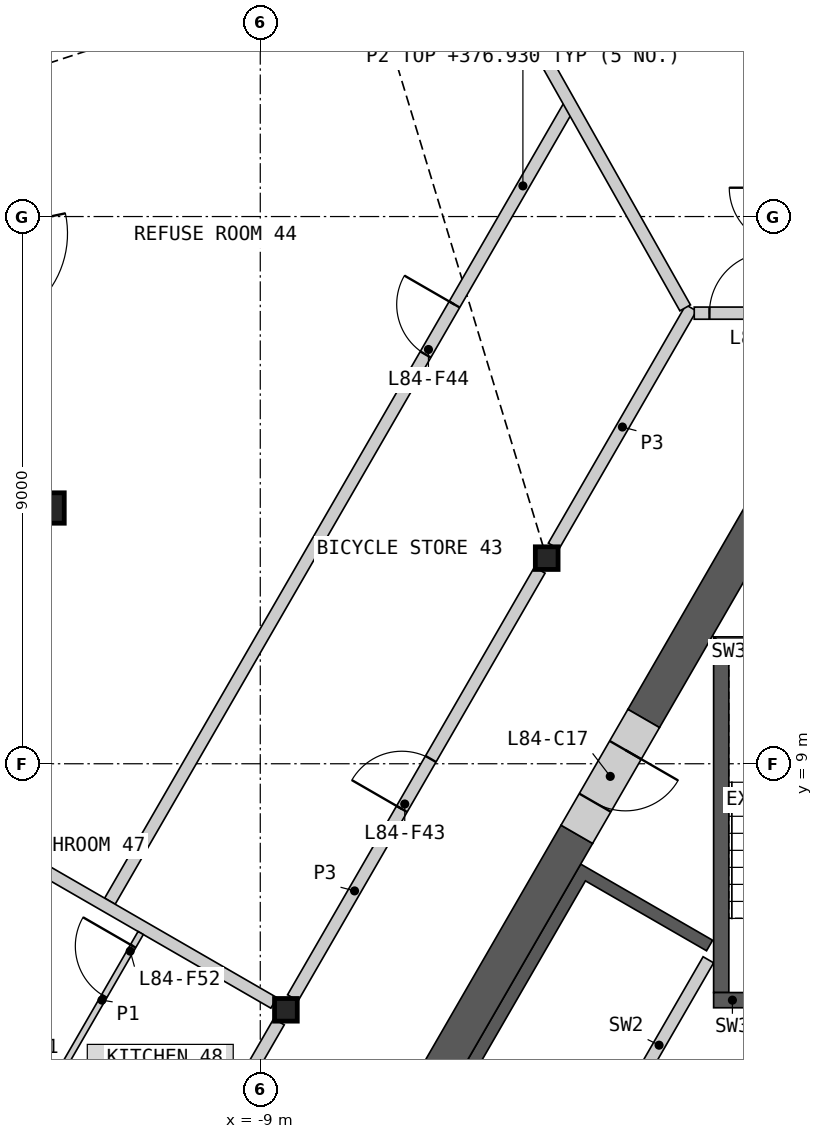
"""IFC4 building model, lengths in metres.
Left out: names, types, materials, properties, quantities, classifications, styles, units other than length and angle.
Written with IfcOpenShell. Run it as: python <this file> out.ifc"""

import sys

from ifc_helpers import new_model, si_unit, direction, frame, frame_2d, origin, origin_2d, place, context, subcontext, project, spatial, polyline, rectangle, hollow_rectangle, i_section, outline, extrude, element, fill, save


model = new_model("IFC4")
c1 = context("Model", 3, precision=1e-05, world=origin(), true_north=direction((0.0, 1.0)))
c2 = subcontext(c1, "Body", "Model", "MODEL_VIEW")
j1 = project(units=[si_unit("LENGTHUNIT", "METRE"), si_unit("PLANEANGLEUNIT", "RADIAN")], contexts=[c1])
p1 = place(None, origin())
s1 = spatial("IfcSite", under=j1, at=p1, CompositionType="ELEMENT")
p2 = place(p1, origin())
s2 = spatial("IfcBuilding", under=s1, at=p2, CompositionType="ELEMENT")
p3 = place(p2, frame((0.0, 0.0, 374.6)))
s3 = spatial("IfcBuildingStorey", under=s2, at=p3, CompositionType="ELEMENT", Elevation=374.6)
p4 = place(p3, frame((-12.474, 13.206, 0.0), z_axis=(0.0, 0.0, 1.0), x_axis=(1.0, 0.0, 0.0)))
e1 = element("IfcColumn", 1, at=p4, inside=s3, PredefinedType="COLUMN", context=c2, shape_type="SweptSolid", body=[
    extrude(hollow_rectangle(XDim=0.5, YDim=0.5, WallThickness=0.03, at=origin_2d()), origin(), (0.0, 0.0, 1.0), 3.4),
])
for number, where, z_axis, x_axis in (
    (2, (-4.289, 12.382, 0.0), (0.0, 0.0, 1.0), (1.0, 0.0, 0.0)),
    (3, (-8.578, 4.953, 0.0), (0.0, 0.0, 1.0), (1.0, 0.0, 0.0)),
):
    element("IfcColumn", number, at=place(p3, frame(where, z_axis=z_axis, x_axis=x_axis)), inside=s3, PredefinedType="COLUMN", context=c2, shape_type="SweptSolid", body=[
        extrude(i_section(OverallWidth=0.374, OverallDepth=0.372, WebThickness=0.016, FlangeThickness=0.026, at=origin_2d()), origin(), (0.0, 0.0, 1.0), 3.4),
    ])
p5 = place(p3, origin())
e4 = element("IfcWall", 4, at=p5, inside=s3, PredefinedType="SHEAR", context=c2, shape_type="SweptSolid", body=[
    extrude(outline(polyline([(-4.96, 0.208), (-7.131, 1.461), (-3.731, 7.35), (-1.561, 6.097), (-1.66, 5.924), (-3.652, 7.074), (-6.852, 1.531), (-4.861, 0.381), (-4.96, 0.208)])), origin(), (0.0, 0.0, 1.0), 3.1),
])
p6 = place(p3, frame((-1.631, 5.776, 0.0), z_axis=(0.0, 0.0, 1.0), x_axis=(-0.499992876559, -0.866029516466, 0.0)))
e5 = element("IfcWall", 5, at=p6, inside=s3, PredefinedType="SOLIDWALL", context=c2, shape_type="SweptSolid", body=[
    extrude(rectangle(XDim=6.486, YDim=0.2, at=frame_2d((3.243, 0.0))), origin(), (0.0, 0.0, 1.0), 3.1),
])
p7 = place(p6, frame((2.637, 0.0, 0.0)))
e6 = element("IfcOpeningElement", 6, at=p7, cuts=e5, PredefinedType="OPENING", context=c2, shape_type="SweptSolid", body=[
    extrude(rectangle(XDim=0.9, YDim=2.1, at=frame_2d((0.45, 1.05))), frame((0.0, 0.11, 0.0), z_axis=(0.0, -1.0, 0.0), x_axis=(1.0, 0.0, 0.0)), (0.0, 0.0, 1.0), 0.22),
])
p8 = place(p3, origin())
e7 = element("IfcWall", 7, at=p8, inside=s3, PredefinedType="SHEAR", context=c2, shape_type="SweptSolid", body=[
    extrude(outline(polyline([(1.544, 11.087), (-1.544, 11.087), (-1.294, 10.837), (1.294, 10.837), (1.544, 11.087)])), origin(), (0.0, 0.0, 1.0), 3.1),
])
p9 = place(p3, origin())
e8 = element("IfcWall", 8, at=p9, inside=s3, PredefinedType="SHEAR", context=c2, shape_type="SweptSolid", body=[
    extrude(outline(polyline([(-1.294, 10.837), (-1.544, 11.087), (-1.544, 5.237), (-1.294, 5.237), (-1.294, 10.837)])), origin(), (0.0, 0.0, 1.0), 3.1),
])
p10 = place(p3, frame((1.544, 5.112, 0.0), z_axis=(0.0, 0.0, 1.0), x_axis=(-1.0, 0.0, 0.0)))
e9 = element("IfcWall", 9, at=p10, inside=s3, PredefinedType="SHEAR", context=c2, shape_type="SweptSolid", body=[
    extrude(rectangle(XDim=3.088, YDim=0.25, at=frame_2d((1.544, 0.0))), origin(), (0.0, 0.0, 1.0), 3.1),
])
p11 = place(p10, frame((0.994, 0.0, 0.0)))
e10 = element("IfcOpeningElement", 10, at=p11, cuts=e9, PredefinedType="OPENING", context=c2, shape_type="SweptSolid", body=[
    extrude(rectangle(XDim=1.1, YDim=2.1, at=frame_2d((0.55, 1.05))), frame((0.0, 0.135, 0.0), z_axis=(0.0, -1.0, 0.0), x_axis=(1.0, 0.0, 0.0)), (0.0, 0.0, 1.0), 0.27),
])
p12 = place(p3, frame((-3.794, 7.84, 0.0), z_axis=(0.0, 0.0, 1.0), x_axis=(-0.499974747889, -0.866039982607, 0.0)))
e11 = element("IfcWall", 11, at=p12, inside=s3, PredefinedType="SHEAR", context=c2, shape_type="SweptSolid", body=[
    extrude(rectangle(XDim=7.092, YDim=0.6, at=frame_2d((3.546, 0.0))), origin(), (0.0, 0.0, 1.0), 3.1),
])
p13 = place(p3, frame((-0.26, 13.961, 0.0), z_axis=(0.0, 0.0, 1.0), x_axis=(-0.50000604952, -0.866021911064, 0.0)))
e12 = element("IfcWall", 12, at=p13, inside=s3, PredefinedType="SHEAR", context=c2, shape_type="SweptSolid", body=[
    extrude(rectangle(XDim=4.869, YDim=0.6, at=frame_2d((2.434, 0.0))), origin(), (0.0, 0.0, 1.0), 3.1),
])
p14 = place(p3, frame((-2.694, 9.745, 0.0), z_axis=(0.0, 0.0, 1.0), x_axis=(-0.50002983664, -0.866008176907, 0.0)))
e13 = element("IfcWall", 13, at=p14, inside=s3, PredefinedType="SHEAR", context=c2, shape_type="SweptSolid", body=[
    extrude(rectangle(XDim=2.2, YDim=0.6, at=frame_2d((1.1, 0.0))), origin(), (0.0, 0.0, 1.0), 3.1),
])
p15 = place(p14, frame((0.6, 0.0, 0.0)))
e14 = element("IfcOpeningElement", 14, at=p15, cuts=e13, PredefinedType="OPENING", context=c2, shape_type="SweptSolid", body=[
    extrude(rectangle(XDim=1.0, YDim=2.1, at=frame_2d((0.5, 1.05))), frame((0.0, 0.31, 0.0), z_axis=(0.0, -1.0, 0.0), x_axis=(1.0, 0.0, 0.0)), (0.0, 0.0, 1.0), 0.62),
])
p16 = place(p3, frame((-8.465, 5.15, 0.0), z_axis=(0.0, 0.0, 1.0), x_axis=(0.499992155518, 0.866029932751, 0.0)))
e15 = element("IfcWall", 15, at=p16, inside=s3, PredefinedType="PARTITIONING", context=c2, shape_type="SweptSolid", body=[
    extrude(rectangle(XDim=8.123, YDim=0.2, at=frame_2d((4.062, 0.0))), origin(), (0.0, 0.0, 1.0), 3.1),
])
p17 = place(p16, frame((3.587, 0.0, 0.0)))
e16 = element("IfcOpeningElement", 16, at=p17, cuts=e15, PredefinedType="OPENING", context=c2, shape_type="SweptSolid", body=[
    extrude(rectangle(XDim=0.95, YDim=2.1, at=frame_2d((0.475, 1.05))), frame((0.0, 0.11, 0.0), z_axis=(0.0, -1.0, 0.0), x_axis=(1.0, 0.0, 0.0)), (0.0, 0.0, 1.0), 0.22),
])
p18 = place(p3, frame((-12.754, -2.279, 0.0), z_axis=(0.0, 0.0, 1.0), x_axis=(0.500001682468, 0.866024432409, 0.0)))
e17 = element("IfcWall", 17, at=p18, inside=s3, PredefinedType="PARTITIONING", context=c2, shape_type="SweptSolid", body=[
    extrude(rectangle(XDim=8.124, YDim=0.2, at=frame_2d((4.062, 0.0))), origin(), (0.0, 0.0, 1.0), 3.1),
])
p19 = place(p18, frame((3.762, 0.0, 0.0)))
e18 = element("IfcOpeningElement", 18, at=p19, cuts=e17, PredefinedType="OPENING", context=c2, shape_type="SweptSolid", body=[
    extrude(rectangle(XDim=1.0, YDim=2.1, at=frame_2d((0.5, 1.05))), frame((0.0, 0.11, 0.0), z_axis=(0.0, -1.0, 0.0), x_axis=(1.0, 0.0, 0.0)), (0.0, 0.0, 1.0), 0.22),
])
p20 = place(p3, frame((-4.176, 12.579, 0.0), z_axis=(0.0, 0.0, 1.0), x_axis=(0.499974648164, 0.866040040179, 0.0)))
e19 = element("IfcWall", 19, at=p20, inside=s3, PredefinedType="PARTITIONING", context=c2, shape_type="SweptSolid", body=[
    extrude(rectangle(XDim=4.525, YDim=0.2, at=frame_2d((2.263, 0.0))), origin(), (0.0, 0.0, 1.0), 3.1),
])
p21 = place(p3, frame((-1.863, 16.411, 0.0), z_axis=(0.0, 0.0, 1.0), x_axis=(1.0, 0.0, 0.0)))
e20 = element("IfcWall", 20, at=p21, inside=s3, PredefinedType="PARTITIONING", context=c2, shape_type="SweptSolid", body=[
    extrude(rectangle(XDim=3.701, YDim=0.2, at=frame_2d((1.851, 0.0))), origin(), (0.0, 0.0, 1.0), 3.1),
])
p22 = place(p21, frame((0.25, 0.0, 0.0)))
e21 = element("IfcOpeningElement", 21, at=p22, cuts=e20, PredefinedType="OPENING", context=c2, shape_type="SweptSolid", body=[
    extrude(rectangle(XDim=1.0, YDim=2.1, at=frame_2d((0.5, 1.05))), frame((0.0, 0.11, 0.0), z_axis=(0.0, -1.0, 0.0), x_axis=(1.0, 0.0, 0.0)), (0.0, 0.0, 1.0), 0.22),
])
p23 = place(p3, frame((-11.473, 6.74, 0.0), z_axis=(0.0, 0.0, 1.0), x_axis=(0.500001082559, 0.866024778768, 0.0)))
e22 = element("IfcWall", 22, at=p23, inside=s3, PredefinedType="PARTITIONING", context=c2, shape_type="SweptSolid", body=[
    extrude(rectangle(XDim=15.094, YDim=0.2, at=frame_2d((7.547, 0.0))), origin(), (0.0, 0.0, 1.0), 2.33),
])
p24 = place(p23, frame((10.383, 0.0, 0.0)))
e23 = element("IfcOpeningElement", 23, at=p24, cuts=e22, PredefinedType="OPENING", context=c2, shape_type="SweptSolid", body=[
    extrude(rectangle(XDim=0.95, YDim=2.1, at=frame_2d((0.475, 1.05))), frame((0.0, 0.11, 0.0), z_axis=(0.0, -1.0, 0.0), x_axis=(1.0, 0.0, 0.0)), (0.0, 0.0, 1.0), 0.22),
])
p25 = place(p3, frame((-8.865, 28.649, 0.0), z_axis=(0.0, 0.0, 1.0), x_axis=(0.491236420263, -0.871026279401, 0.0)))
e24 = element("IfcWall", 24, at=p25, inside=s3, PredefinedType="PARTITIONING", context=c2, shape_type="SweptSolid", body=[
    extrude(rectangle(XDim=13.95, YDim=0.2, at=frame_2d((6.975, 0.0))), origin(), (0.0, 0.0, 1.0), 2.33),
])
p26 = place(p3, frame((-18.869, 10.894, 0.0), z_axis=(0.0, 0.0, 1.0), x_axis=(0.866023724155, -0.500002909193, 0.0)))
e25 = element("IfcWall", 25, at=p26, inside=s3, PredefinedType="PARTITIONING", context=c2, shape_type="SweptSolid", body=[
    extrude(rectangle(XDim=11.655, YDim=0.2, at=frame_2d((5.827, 0.0))), origin(), (0.0, 0.0, 1.0), 2.33),
])
p27 = place(p3, frame((-15.318, 5.38, 0.0), z_axis=(0.0, 0.0, 1.0), x_axis=(0.866035260786, -0.499982926783, 0.0)))
e26 = element("IfcWall", 26, at=p27, inside=s3, PredefinedType="PARTITIONING", context=c2, shape_type="SweptSolid", body=[
    extrude(rectangle(XDim=5.95, YDim=0.1, at=frame_2d((2.975, 0.0))), origin(), (0.0, 0.0, 1.0), 2.33),
])
p28 = place(p3, frame((-14.735, 5.389, 0.0), z_axis=(0.0, 0.0, 1.0), x_axis=(0.866032775405, -0.499987231761, 0.0)))
e27 = element("IfcWall", 27, at=p28, inside=s3, PredefinedType="PARTITIONING", context=c2, shape_type="SweptSolid", body=[
    extrude(rectangle(XDim=2.9, YDim=0.1, at=frame_2d((1.45, 0.0))), origin(), (0.0, 0.0, 1.0), 2.33),
])
p29 = place(p3, frame((-12.242, 4.008, 0.0), z_axis=(0.0, 0.0, 1.0), x_axis=(0.499948979701, 0.866054858364, 0.0)))
e28 = element("IfcWall", 28, at=p29, inside=s3, PredefinedType="PARTITIONING", context=c2, shape_type="SweptSolid", body=[
    extrude(rectangle(XDim=2.55, YDim=0.1, at=frame_2d((1.275, 0.0))), origin(), (0.0, 0.0, 1.0), 2.33),
])
p30 = place(p29, frame((1.35, 0.0, 0.0)))
e29 = element("IfcOpeningElement", 29, at=p30, cuts=e28, PredefinedType="OPENING", context=c2, shape_type="SweptSolid", body=[
    extrude(rectangle(XDim=0.95, YDim=2.1, at=frame_2d((0.475, 1.05))), frame((0.0, 0.06, 0.0), z_axis=(0.0, -1.0, 0.0), x_axis=(1.0, 0.0, 0.0)), (0.0, 0.0, 1.0), 0.12),
])
p31 = place(p15, origin())
e30 = element("IfcDoor", 30, at=p31, inside=s3, OperationType="SINGLE_SWING_LEFT", PredefinedType="DOOR", context=c2, shape_type="SweptSolid", body=[
    extrude(rectangle(XDim=1.0, YDim=2.1, at=frame_2d((0.5, 1.05))), frame((0.0, 0.055, 0.0), z_axis=(0.0, -1.0, 0.0), x_axis=(1.0, 0.0, 0.0)), (0.0, 0.0, 1.0), 0.05),
])
fill(e14, e30)
p32 = place(p22, origin())
e31 = element("IfcDoor", 31, at=p32, inside=s3, OperationType="SINGLE_SWING_RIGHT", PredefinedType="DOOR", context=c2, shape_type="SweptSolid", body=[
    extrude(rectangle(XDim=1.0, YDim=2.1, at=frame_2d((0.5, 1.05))), frame((0.0, 0.025, 0.0), z_axis=(0.0, -1.0, 0.0), x_axis=(1.0, 0.0, 0.0)), (0.0, 0.0, 1.0), 0.05),
])
fill(e21, e31)
p33 = place(p17, origin())
e32 = element("IfcDoor", 32, at=p33, inside=s3, OperationType="SINGLE_SWING_LEFT", PredefinedType="DOOR", context=c2, shape_type="SweptSolid", body=[
    extrude(rectangle(XDim=0.95, YDim=2.1, at=frame_2d((0.475, 1.05))), frame((0.0, 0.025, 0.0), z_axis=(0.0, -1.0, 0.0), x_axis=(1.0, 0.0, 0.0)), (0.0, 0.0, 1.0), 0.05),
])
fill(e16, e32)
p34 = place(p24, origin())
e33 = element("IfcDoor", 33, at=p34, inside=s3, OperationType="SINGLE_SWING_RIGHT", PredefinedType="DOOR", context=c2, shape_type="SweptSolid", body=[
    extrude(rectangle(XDim=0.95, YDim=2.1, at=frame_2d((0.475, 1.05))), frame((0.0, 0.025, 0.0), z_axis=(0.0, -1.0, 0.0), x_axis=(1.0, 0.0, 0.0)), (0.0, 0.0, 1.0), 0.05),
])
fill(e23, e33)
p35 = place(p30, origin())
e34 = element("IfcDoor", 34, at=p35, inside=s3, OperationType="SINGLE_SWING_RIGHT", PredefinedType="DOOR", context=c2, shape_type="SweptSolid", body=[
    extrude(rectangle(XDim=0.95, YDim=2.1, at=frame_2d((0.475, 1.05))), frame((0.0, 0.025, 0.0), z_axis=(0.0, -1.0, 0.0), x_axis=(1.0, 0.0, 0.0)), (0.0, 0.0, 1.0), 0.05),
])
fill(e29, e34)
save(model, sys.argv[1])
